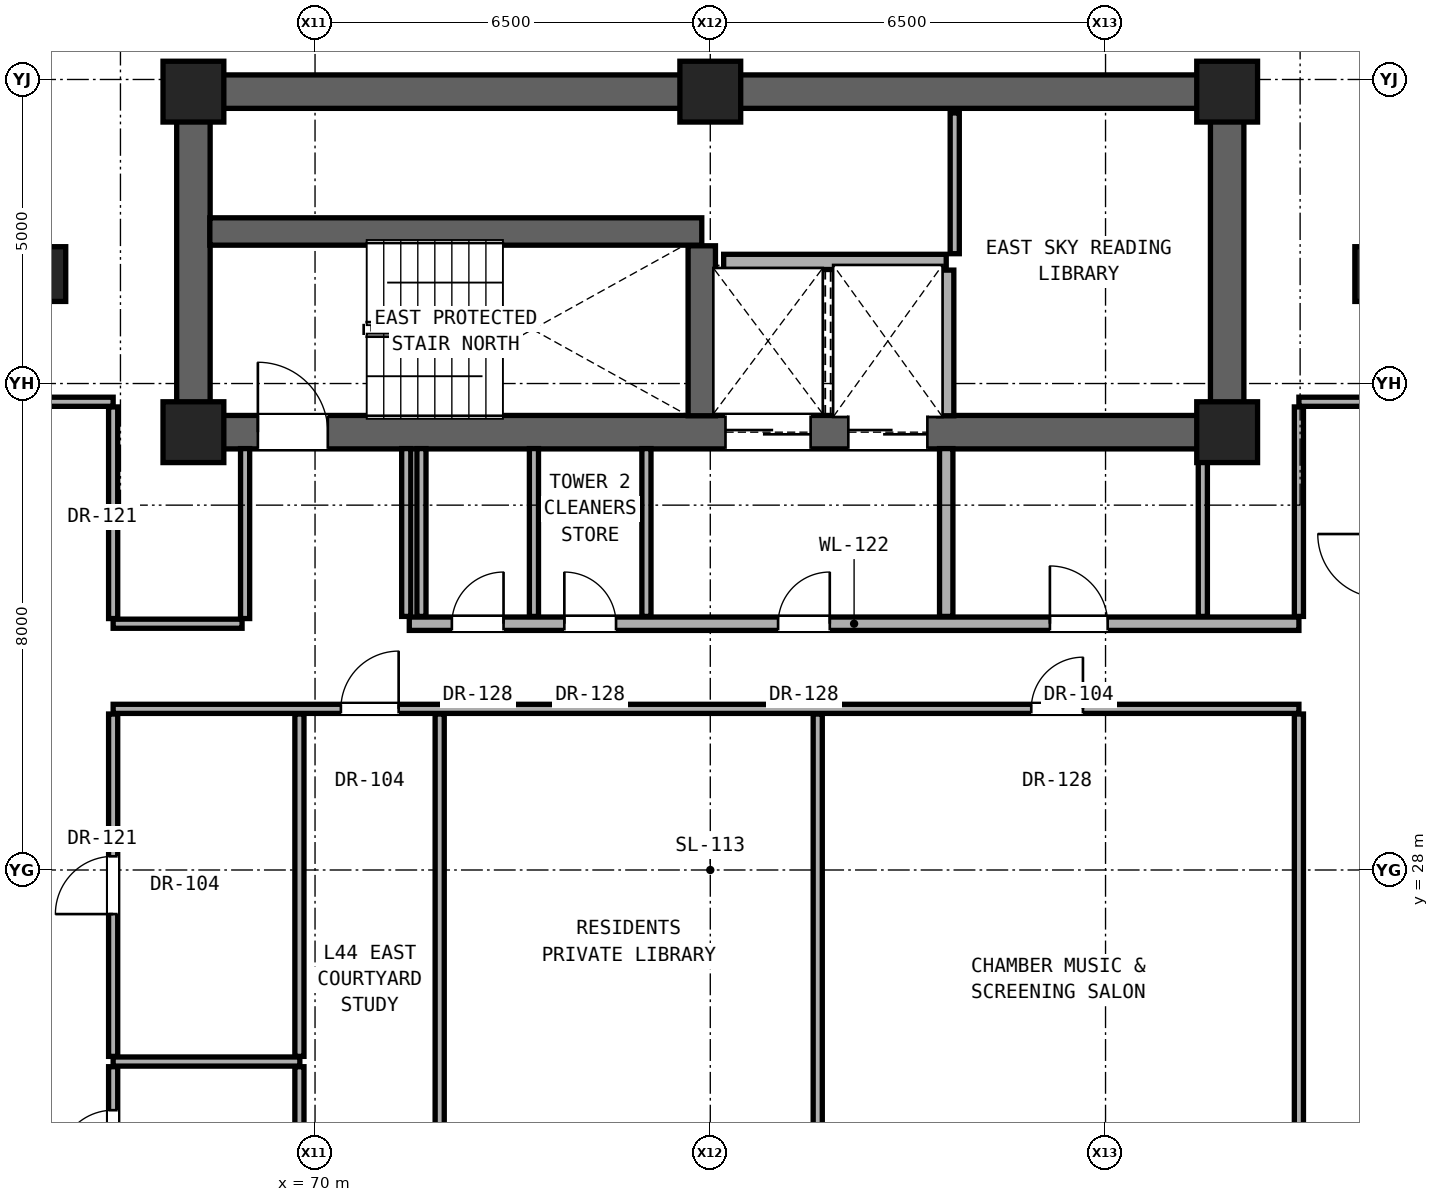
"""IFC4 building model, lengths in metres.
Left out: names, types, materials, properties, quantities, classifications, styles, units other than length and angle.
Written with IfcOpenShell. Run it as: python <this file> out.ifc"""

import sys

from ifc_helpers import new_model, si_unit, direction, frame, frame_2d, origin, origin_2d, place, context, subcontext, project, spatial, rectangle, extrude, element, fill, save


model = new_model("IFC4")
c1 = context("Model", 3, precision=1e-05, world=origin(), true_north=direction((0.0, 1.0)))
c2 = subcontext(c1, "Body", "Model", "MODEL_VIEW")
j1 = project(units=[si_unit("LENGTHUNIT", "METRE"), si_unit("PLANEANGLEUNIT", "RADIAN")], contexts=[c1])
p1 = place(None, origin())
s1 = spatial("IfcSite", under=j1, at=p1, CompositionType="ELEMENT")
p2 = place(p1, origin())
s2 = spatial("IfcBuilding", under=s1, at=p2, CompositionType="ELEMENT")
p3 = place(p2, frame((0.0, 0.0, 157.65)))
s3 = spatial("IfcBuildingStorey", under=s2, at=p3, CompositionType="ELEMENT", Elevation=157.65)
for number, where, z_axis, x_axis in (
    (1, (68.0, 35.2, 0.0), (0.0, 0.0, 1.0), (1.0, 0.0, 0.0)),
    (2, (85.0, 35.2, 0.0), (0.0, 0.0, 1.0), (1.0, 0.0, 0.0)),
    (3, (68.0, 40.8, 0.0), (0.0, 0.0, 1.0), (1.0, 0.0, 0.0)),
    (4, (76.5, 40.8, 0.0), (0.0, 0.0, 1.0), (1.0, 0.0, 0.0)),
    (5, (85.0, 40.8, 0.0), (0.0, 0.0, 1.0), (1.0, 0.0, 0.0)),
):
    element("IfcColumn", number, at=place(p3, frame(where, z_axis=z_axis, x_axis=x_axis)), inside=s3, PredefinedType="COLUMN", context=c2, shape_type="SweptSolid", body=[
        extrude(rectangle(XDim=1.0, YDim=1.0, at=origin_2d()), origin(), (0.0, 0.0, 1.0), 3.25),
    ])
for number, where, z_axis, x_axis in (
    (6, (65.6, 37.8, 0.0), (0.0, 0.0, 1.0), (1.0, 0.0, 0.0)),
    (7, (87.4, 37.8, 0.0), (0.0, 0.0, 1.0), (1.0, 0.0, 0.0)),
):
    element("IfcColumn", number, at=place(p3, frame(where, z_axis=z_axis, x_axis=x_axis)), inside=s3, PredefinedType="PILASTER", context=c2, shape_type="SweptSolid", body=[
        extrude(rectangle(XDim=0.6, YDim=0.9, at=origin_2d()), origin(), (0.0, 0.0, 1.0), 3.25),
    ])
p4 = place(p3, frame((68.0, 40.8, 0.0), z_axis=(0.0, 0.0, 1.0), x_axis=(1.0, 0.0, 0.0)))
e8 = element("IfcWall", 8, at=p4, inside=s3, PredefinedType="SHEAR", context=c2, shape_type="SweptSolid", body=[
    extrude(rectangle(XDim=17.0, YDim=0.55, at=frame_2d((8.5, 0.0))), origin(), (0.0, 0.0, 1.0), 3.05),
])
for number, where, z_axis, x_axis in (
    (9, (68.0, 35.2, 0.0), (0.0, 0.0, 1.0), (0.0, 1.0, 0.0)),
    (10, (85.0, 35.2, 0.0), (0.0, 0.0, 1.0), (0.0, 1.0, 0.0)),
):
    element("IfcWall", number, at=place(p3, frame(where, z_axis=z_axis, x_axis=x_axis)), inside=s3, PredefinedType="SHEAR", context=c2, shape_type="SweptSolid", body=[
        extrude(rectangle(XDim=5.6, YDim=0.55, at=frame_2d((2.8, 0.0))), origin(), (0.0, 0.0, 1.0), 3.05),
    ])
p5 = place(p3, frame((68.0, 35.2, 0.0), z_axis=(0.0, 0.0, 1.0), x_axis=(1.0, 0.0, 0.0)))
e11 = element("IfcWall", 11, at=p5, inside=s3, PredefinedType="SHEAR", context=c2, shape_type="SweptSolid", body=[
    extrude(rectangle(XDim=17.0, YDim=0.55, at=frame_2d((8.5, 0.0))), origin(), (0.0, 0.0, 1.0), 3.05),
])
p6 = place(p5, frame((1.06, 0.0, 0.0)))
e12 = element("IfcOpeningElement", 12, at=p6, cuts=e11, PredefinedType="OPENING", context=c2, shape_type="SweptSolid", body=[
    extrude(rectangle(XDim=1.15, YDim=2.2, at=frame_2d((0.575, 1.1))), frame((0.0, 0.285, 0.0), z_axis=(0.0, -1.0, 0.0), x_axis=(1.0, 0.0, 0.0)), (0.0, 0.0, 1.0), 0.57),
])
p7 = place(p5, frame((8.75, 0.0, 0.0)))
e13 = element("IfcOpeningElement", 13, at=p7, cuts=e11, PredefinedType="OPENING", context=c2, shape_type="SweptSolid", body=[
    extrude(rectangle(XDim=1.4, YDim=2.35, at=frame_2d((0.7, 1.175))), frame((0.0, 0.285, 0.0), z_axis=(0.0, -1.0, 0.0), x_axis=(1.0, 0.0, 0.0)), (0.0, 0.0, 1.0), 0.57),
])
p8 = place(p5, frame((10.77, 0.0, 0.0)))
e14 = element("IfcOpeningElement", 14, at=p8, cuts=e11, PredefinedType="OPENING", context=c2, shape_type="SweptSolid", body=[
    extrude(rectangle(XDim=1.3, YDim=2.3, at=frame_2d((0.65, 1.15))), frame((0.0, 0.285, 0.0), z_axis=(0.0, -1.0, 0.0), x_axis=(1.0, 0.0, 0.0)), (0.0, 0.0, 1.0), 0.57),
])
p9 = place(p3, frame((66.68, 24.85, 0.0), z_axis=(0.0, 0.0, 1.0), x_axis=(1.0, 0.0, 0.0)))
e15 = element("IfcWall", 15, at=p9, inside=s3, PredefinedType="PARTITIONING", context=c2, shape_type="SweptSolid", body=[
    extrude(rectangle(XDim=3.07, YDim=0.15, at=frame_2d((1.535, 0.0))), origin(), (0.0, 0.0, 1.0), 2.186),
])
p10 = place(p3, frame((66.68, 30.65, 0.0), z_axis=(0.0, 0.0, 1.0), x_axis=(1.0, 0.0, 0.0)))
e16 = element("IfcWall", 16, at=p10, inside=s3, PredefinedType="PARTITIONING", context=c2, shape_type="SweptSolid", body=[
    extrude(rectangle(XDim=19.5, YDim=0.15, at=frame_2d((9.75, 0.0))), origin(), (0.0, 0.0, 1.0), 2.186),
])
p11 = place(p10, frame((3.745, 0.0, 0.0)))
e17 = element("IfcOpeningElement", 17, at=p11, cuts=e16, PredefinedType="OPENING", context=c2, shape_type="SweptSolid", body=[
    extrude(rectangle(XDim=0.95, YDim=2.15, at=frame_2d((0.475, 1.075))), frame((0.0, 0.085, 0.0), z_axis=(0.0, -1.0, 0.0), x_axis=(1.0, 0.0, 0.0)), (0.0, 0.0, 1.0), 0.17),
])
p12 = place(p10, frame((15.098, 0.0, 0.0)))
e18 = element("IfcOpeningElement", 18, at=p12, cuts=e16, PredefinedType="OPENING", context=c2, shape_type="SweptSolid", body=[
    extrude(rectangle(XDim=0.85, YDim=2.01, at=frame_2d((0.425, 1.005))), frame((0.0, 0.085, 0.0), z_axis=(0.0, -1.0, 0.0), x_axis=(1.0, 0.0, 0.0)), (0.0, 0.0, 1.0), 0.17),
])
p13 = place(p3, frame((66.68, 32.05, 0.0), z_axis=(0.0, 0.0, 1.0), x_axis=(1.0, 0.0, 0.0)))
e19 = element("IfcWall", 19, at=p13, inside=s3, PredefinedType="PARTITIONING", context=c2, shape_type="SweptSolid", body=[
    extrude(rectangle(XDim=2.12, YDim=0.15, at=frame_2d((1.06, 0.0))), origin(), (0.0, 0.0, 1.0), 2.186),
])
p14 = place(p3, frame((71.55, 32.05, 0.0), z_axis=(0.0, 0.0, 1.0), x_axis=(1.0, 0.0, 0.0)))
e20 = element("IfcWall", 20, at=p14, inside=s3, PredefinedType="SOLIDWALL", context=c2, shape_type="SweptSolid", body=[
    extrude(rectangle(XDim=14.63, YDim=0.22, at=frame_2d((7.315, 0.0))), origin(), (0.0, 0.0, 1.0), 2.186),
])
p15 = place(p14, frame((6.065, 0.0, 0.0)))
e21 = element("IfcOpeningElement", 21, at=p15, cuts=e20, PredefinedType="OPENING", context=c2, shape_type="SweptSolid", body=[
    extrude(rectangle(XDim=0.85, YDim=2.01, at=frame_2d((0.425, 1.005))), frame((0.0, 0.12, 0.0), z_axis=(0.0, -1.0, 0.0), x_axis=(1.0, 0.0, 0.0)), (0.0, 0.0, 1.0), 0.24),
])
p16 = place(p14, frame((10.535, 0.0, 0.0)))
e22 = element("IfcOpeningElement", 22, at=p16, cuts=e20, PredefinedType="OPENING", context=c2, shape_type="SweptSolid", body=[
    extrude(rectangle(XDim=0.95, YDim=2.15, at=frame_2d((0.475, 1.075))), frame((0.0, 0.12, 0.0), z_axis=(0.0, -1.0, 0.0), x_axis=(1.0, 0.0, 0.0)), (0.0, 0.0, 1.0), 0.24),
])
p17 = place(p14, frame((0.7, 0.0, 0.0)))
e23 = element("IfcOpeningElement", 23, at=p17, cuts=e20, PredefinedType="OPENING", context=c2, shape_type="SweptSolid", body=[
    extrude(rectangle(XDim=0.85, YDim=2.01, at=frame_2d((0.425, 1.005))), frame((0.0, 0.12, 0.0), z_axis=(0.0, -1.0, 0.0), x_axis=(1.0, 0.0, 0.0)), (0.0, 0.0, 1.0), 0.24),
])
p18 = place(p14, frame((2.55, 0.0, 0.0)))
e24 = element("IfcOpeningElement", 24, at=p18, cuts=e20, PredefinedType="OPENING", context=c2, shape_type="SweptSolid", body=[
    extrude(rectangle(XDim=0.85, YDim=2.01, at=frame_2d((0.425, 1.005))), frame((0.0, 0.12, 0.0), z_axis=(0.0, -1.0, 0.0), x_axis=(1.0, 0.0, 0.0)), (0.0, 0.0, 1.0), 0.24),
])
p19 = place(p3, frame((65.32, 35.7, 0.0), z_axis=(0.0, 0.0, 1.0), x_axis=(1.0, 0.0, 0.0)))
e25 = element("IfcWall", 25, at=p19, inside=s3, PredefinedType="PARTITIONING", context=c2, shape_type="SweptSolid", body=[
    extrude(rectangle(XDim=1.36, YDim=0.15, at=frame_2d((0.68, 0.0))), origin(), (0.0, 0.0, 1.0), 3.05),
])
p20 = place(p3, frame((86.18, 35.7, 0.0), z_axis=(0.0, 0.0, 1.0), x_axis=(1.0, 0.0, 0.0)))
e26 = element("IfcWall", 26, at=p20, inside=s3, PredefinedType="PARTITIONING", context=c2, shape_type="SweptSolid", body=[
    extrude(rectangle(XDim=1.36, YDim=0.15, at=frame_2d((0.68, 0.0))), origin(), (0.0, 0.0, 1.0), 3.05),
])
p21 = place(p3, frame((76.72, 38.0, 0.0), z_axis=(0.0, 0.0, 1.0), x_axis=(1.0, 0.0, 0.0)))
e27 = element("IfcWall", 27, at=p21, inside=s3, PredefinedType="SOLIDWALL", context=c2, shape_type="SweptSolid", body=[
    extrude(rectangle(XDim=3.66, YDim=0.25, at=frame_2d((1.83, 0.0))), origin(), (0.0, 0.0, 1.0), 3.05),
])
p22 = place(p3, frame((68.27, 38.5, 0.0), z_axis=(0.0, 0.0, 1.0), x_axis=(1.0, 0.0, 0.0)))
e28 = element("IfcWall", 28, at=p22, inside=s3, PredefinedType="SHEAR", context=c2, shape_type="SweptSolid", body=[
    extrude(rectangle(XDim=8.09, YDim=0.45, at=frame_2d((4.045, 0.0))), origin(), (0.0, 0.0, 1.0), 3.05),
])
p23 = place(p3, frame((66.68, 22.435, 0.0), z_axis=(0.0, 0.0, 1.0), x_axis=(0.0, 1.0, 0.0)))
e29 = element("IfcWall", 29, at=p23, inside=s3, PredefinedType="PARTITIONING", context=c2, shape_type="SweptSolid", body=[
    extrude(rectangle(XDim=2.33, YDim=0.15, at=frame_2d((1.165, 0.0))), origin(), (0.0, 0.0, 1.0), 3.05),
])
p24 = place(p23, frame((0.715, 0.0, 0.0)))
e30 = element("IfcOpeningElement", 30, at=p24, cuts=e29, PredefinedType="OPENING", context=c2, shape_type="SweptSolid", body=[
    extrude(rectangle(XDim=0.9, YDim=2.1, at=frame_2d((0.45, 1.05))), frame((0.0, 0.085, 0.0), z_axis=(0.0, -1.0, 0.0), x_axis=(1.0, 0.0, 0.0)), (0.0, 0.0, 1.0), 0.17),
])
p25 = place(p3, frame((66.68, 24.935, 0.0), z_axis=(0.0, 0.0, 1.0), x_axis=(0.0, 1.0, 0.0)))
e31 = element("IfcWall", 31, at=p25, inside=s3, PredefinedType="PARTITIONING", context=c2, shape_type="SweptSolid", body=[
    extrude(rectangle(XDim=5.63, YDim=0.15, at=frame_2d((2.815, 0.0))), origin(), (0.0, 0.0, 1.0), 2.346),
])
p26 = place(p25, frame((2.34, 0.0, 0.0)))
e32 = element("IfcOpeningElement", 32, at=p26, cuts=e31, PredefinedType="OPENING", context=c2, shape_type="SweptSolid", body=[
    extrude(rectangle(XDim=0.95, YDim=2.15, at=frame_2d((0.475, 1.075))), frame((0.0, 0.085, 0.0), z_axis=(0.0, -1.0, 0.0), x_axis=(1.0, 0.0, 0.0)), (0.0, 0.0, 1.0), 0.17),
])
p27 = place(p3, frame((66.68, 32.135, 0.0), z_axis=(0.0, 0.0, 1.0), x_axis=(0.0, 1.0, 0.0)))
e33 = element("IfcWall", 33, at=p27, inside=s3, PredefinedType="PARTITIONING", context=c2, shape_type="SweptSolid", body=[
    extrude(rectangle(XDim=3.48, YDim=0.15, at=frame_2d((1.74, 0.0))), origin(), (0.0, 0.0, 1.0), 2.442),
])
p28 = place(p3, frame((68.85, 32.135, 0.0), z_axis=(0.0, 0.0, 1.0), x_axis=(0.0, 1.0, 0.0)))
e34 = element("IfcWall", 34, at=p28, inside=s3, PredefinedType="PARTITIONING", context=c2, shape_type="SweptSolid", body=[
    extrude(rectangle(XDim=2.795, YDim=0.15, at=frame_2d((1.397, 0.0))), origin(), (0.0, 0.0, 1.0), 3.05),
])
p29 = place(p3, frame((69.743, 22.435, 0.0), z_axis=(0.0, 0.0, 1.0), x_axis=(0.0, 1.0, 0.0)))
e35 = element("IfcWall", 35, at=p29, inside=s3, PredefinedType="PARTITIONING", context=c2, shape_type="SweptSolid", body=[
    extrude(rectangle(XDim=2.33, YDim=0.15, at=frame_2d((1.165, 0.0))), origin(), (0.0, 0.0, 1.0), 3.05),
])
p30 = place(p3, frame((69.743, 24.935, 0.0), z_axis=(0.0, 0.0, 1.0), x_axis=(0.0, 1.0, 0.0)))
e36 = element("IfcWall", 36, at=p30, inside=s3, PredefinedType="PARTITIONING", context=c2, shape_type="SweptSolid", body=[
    extrude(rectangle(XDim=5.63, YDim=0.15, at=frame_2d((2.815, 0.0))), origin(), (0.0, 0.0, 1.0), 2.186),
])
for number, where, z_axis, x_axis in (
    (37, (71.5, 32.17, 0.0), (0.0, 0.0, 1.0), (0.0, 1.0, 0.0)),
    (38, (71.75, 32.17, 0.0), (0.0, 0.0, 1.0), (0.0, 1.0, 0.0)),
):
    element("IfcWall", number, at=place(p3, frame(where, z_axis=z_axis, x_axis=x_axis)), inside=s3, PredefinedType="PARTITIONING", context=c2, shape_type="SweptSolid", body=[
        extrude(rectangle(XDim=2.76, YDim=0.15, at=frame_2d((1.38, 0.0))), origin(), (0.0, 0.0, 1.0), 3.05),
    ])
p31 = place(p3, frame((72.05, 22.435, 0.0), z_axis=(0.0, 0.0, 1.0), x_axis=(0.0, 1.0, 0.0)))
e39 = element("IfcWall", 39, at=p31, inside=s3, PredefinedType="PARTITIONING", context=c2, shape_type="SweptSolid", body=[
    extrude(rectangle(XDim=8.13, YDim=0.15, at=frame_2d((4.065, 0.0))), origin(), (0.0, 0.0, 1.0), 2.186),
])
for number, where, z_axis, x_axis in (
    (40, (73.6, 32.17, 0.0), (0.0, 0.0, 1.0), (0.0, 1.0, 0.0)),
    (41, (75.45, 32.17, 0.0), (0.0, 0.0, 1.0), (0.0, 1.0, 0.0)),
):
    element("IfcWall", number, at=place(p3, frame(where, z_axis=z_axis, x_axis=x_axis)), inside=s3, PredefinedType="PARTITIONING", context=c2, shape_type="SweptSolid", body=[
        extrude(rectangle(XDim=2.76, YDim=0.15, at=frame_2d((1.38, 0.0))), origin(), (0.0, 0.0, 1.0), 3.05),
    ])
p32 = place(p3, frame((76.36, 35.47, 0.0), z_axis=(0.0, 0.0, 1.0), x_axis=(0.0, 1.0, 0.0)))
e42 = element("IfcWall", 42, at=p32, inside=s3, PredefinedType="SHEAR", context=c2, shape_type="SweptSolid", body=[
    extrude(rectangle(XDim=2.795, YDim=0.45, at=frame_2d((1.397, 0.0))), origin(), (0.0, 0.0, 1.0), 3.05),
])
p33 = place(p3, frame((78.267, 22.435, 0.0), z_axis=(0.0, 0.0, 1.0), x_axis=(0.0, 1.0, 0.0)))
e43 = element("IfcWall", 43, at=p33, inside=s3, PredefinedType="PARTITIONING", context=c2, shape_type="SweptSolid", body=[
    extrude(rectangle(XDim=8.13, YDim=0.15, at=frame_2d((4.065, 0.0))), origin(), (0.0, 0.0, 1.0), 2.186),
])
p34 = place(p3, frame((80.38, 32.17, 0.0), z_axis=(0.0, 0.0, 1.0), x_axis=(0.0, 1.0, 0.0)))
e44 = element("IfcWall", 44, at=p34, inside=s3, PredefinedType="SOLIDWALL", context=c2, shape_type="SweptSolid", body=[
    extrude(rectangle(XDim=2.76, YDim=0.22, at=frame_2d((1.38, 0.0))), origin(), (0.0, 0.0, 1.0), 3.05),
])
p35 = place(p3, frame((80.38, 35.47, 0.0), z_axis=(0.0, 0.0, 1.0), x_axis=(0.0, 1.0, 0.0)))
e45 = element("IfcWall", 45, at=p35, inside=s3, PredefinedType="SOLIDWALL", context=c2, shape_type="SweptSolid", body=[
    extrude(rectangle(XDim=2.395, YDim=0.25, at=frame_2d((1.198, 0.0))), origin(), (0.0, 0.0, 1.0), 3.05),
])
p36 = place(p3, frame((80.52, 38.135, 0.0), z_axis=(0.0, 0.0, 1.0), x_axis=(0.0, 1.0, 0.0)))
e46 = element("IfcWall", 46, at=p36, inside=s3, PredefinedType="PARTITIONING", context=c2, shape_type="SweptSolid", body=[
    extrude(rectangle(XDim=2.315, YDim=0.15, at=frame_2d((1.157, 0.0))), origin(), (0.0, 0.0, 1.0), 3.05),
])
p37 = place(p3, frame((84.6, 32.17, 0.0), z_axis=(0.0, 0.0, 1.0), x_axis=(0.0, 1.0, 0.0)))
e47 = element("IfcWall", 47, at=p37, inside=s3, PredefinedType="PARTITIONING", context=c2, shape_type="SweptSolid", body=[
    extrude(rectangle(XDim=2.76, YDim=0.15, at=frame_2d((1.38, 0.0))), origin(), (0.0, 0.0, 1.0), 3.05),
])
p38 = place(p3, frame((86.18, 22.435, 0.0), z_axis=(0.0, 0.0, 1.0), x_axis=(0.0, 1.0, 0.0)))
e48 = element("IfcWall", 48, at=p38, inside=s3, PredefinedType="PARTITIONING", context=c2, shape_type="SweptSolid", body=[
    extrude(rectangle(XDim=8.13, YDim=0.15, at=frame_2d((4.065, 0.0))), origin(), (0.0, 0.0, 1.0), 2.346),
])
p39 = place(p3, frame((86.18, 32.17, 0.0), z_axis=(0.0, 0.0, 1.0), x_axis=(0.0, 1.0, 0.0)))
e49 = element("IfcWall", 49, at=p39, inside=s3, PredefinedType="PARTITIONING", context=c2, shape_type="SweptSolid", body=[
    extrude(rectangle(XDim=3.445, YDim=0.15, at=frame_2d((1.723, 0.0))), origin(), (0.0, 0.0, 1.0), 2.442),
])
p40 = place(p6, origin())
e50 = element("IfcDoor", 50, at=p40, inside=s3, OperationType="SINGLE_SWING_LEFT", PredefinedType="DOOR", context=c2, shape_type="SweptSolid", body=[
    extrude(rectangle(XDim=1.15, YDim=2.2, at=frame_2d((0.575, 1.1))), frame((0.0, 0.025, 0.0), z_axis=(0.0, -1.0, 0.0), x_axis=(1.0, 0.0, 0.0)), (0.0, 0.0, 1.0), 0.05),
])
fill(e12, e50)
p41 = place(p15, origin())
e51 = element("IfcDoor", 51, at=p41, inside=s3, OperationType="SINGLE_SWING_RIGHT", PredefinedType="DOOR", context=c2, shape_type="SweptSolid", body=[
    extrude(rectangle(XDim=0.85, YDim=2.01, at=frame_2d((0.425, 1.005))), frame((0.0, 0.025, 0.0), z_axis=(0.0, -1.0, 0.0), x_axis=(1.0, 0.0, 0.0)), (0.0, 0.0, 1.0), 0.05),
])
fill(e21, e51)
p42 = place(p16, origin())
e52 = element("IfcDoor", 52, at=p42, inside=s3, OperationType="SINGLE_SWING_LEFT", PredefinedType="DOOR", context=c2, shape_type="SweptSolid", body=[
    extrude(rectangle(XDim=0.95, YDim=2.15, at=frame_2d((0.475, 1.075))), frame((0.0, 0.025, 0.0), z_axis=(0.0, -1.0, 0.0), x_axis=(1.0, 0.0, 0.0)), (0.0, 0.0, 1.0), 0.05),
])
fill(e22, e52)
p43 = place(p17, origin())
e53 = element("IfcDoor", 53, at=p43, inside=s3, OperationType="SINGLE_SWING_RIGHT", PredefinedType="DOOR", context=c2, shape_type="SweptSolid", body=[
    extrude(rectangle(XDim=0.85, YDim=2.01, at=frame_2d((0.425, 1.005))), frame((0.0, 0.025, 0.0), z_axis=(0.0, -1.0, 0.0), x_axis=(1.0, 0.0, 0.0)), (0.0, 0.0, 1.0), 0.05),
])
fill(e23, e53)
p44 = place(p18, origin())
e54 = element("IfcDoor", 54, at=p44, inside=s3, OperationType="SINGLE_SWING_LEFT", PredefinedType="DOOR", context=c2, shape_type="SweptSolid", body=[
    extrude(rectangle(XDim=0.85, YDim=2.01, at=frame_2d((0.425, 1.005))), frame((0.0, 0.025, 0.0), z_axis=(0.0, -1.0, 0.0), x_axis=(1.0, 0.0, 0.0)), (0.0, 0.0, 1.0), 0.05),
])
fill(e24, e54)
p45 = place(p24, origin())
e55 = element("IfcDoor", 55, at=p45, inside=s3, OperationType="SINGLE_SWING_LEFT", PredefinedType="DOOR", context=c2, shape_type="SweptSolid", body=[
    extrude(rectangle(XDim=0.9, YDim=2.1, at=frame_2d((0.45, 1.05))), frame((0.0, 0.025, 0.0), z_axis=(0.0, -1.0, 0.0), x_axis=(1.0, 0.0, 0.0)), (0.0, 0.0, 1.0), 0.05),
])
fill(e30, e55)
p46 = place(p26, origin())
e56 = element("IfcDoor", 56, at=p46, inside=s3, OperationType="SINGLE_SWING_LEFT", PredefinedType="DOOR", context=c2, shape_type="SweptSolid", body=[
    extrude(rectangle(XDim=0.95, YDim=2.15, at=frame_2d((0.475, 1.075))), frame((0.0, 0.025, 0.0), z_axis=(0.0, -1.0, 0.0), x_axis=(1.0, 0.0, 0.0)), (0.0, 0.0, 1.0), 0.05),
])
fill(e32, e56)
p47 = place(p11, origin())
e57 = element("IfcDoor", 57, at=p47, inside=s3, OperationType="SINGLE_SWING_RIGHT", PredefinedType="DOOR", context=c2, shape_type="SweptSolid", body=[
    extrude(rectangle(XDim=0.95, YDim=2.15, at=frame_2d((0.475, 1.075))), frame((0.0, 0.025, 0.0), z_axis=(0.0, -1.0, 0.0), x_axis=(1.0, 0.0, 0.0)), (0.0, 0.0, 1.0), 0.05),
])
fill(e17, e57)
p48 = place(p12, origin())
e58 = element("IfcDoor", 58, at=p48, inside=s3, OperationType="SINGLE_SWING_RIGHT", PredefinedType="DOOR", context=c2, shape_type="SweptSolid", body=[
    extrude(rectangle(XDim=0.85, YDim=2.01, at=frame_2d((0.425, 1.005))), frame((0.0, 0.025, 0.0), z_axis=(0.0, -1.0, 0.0), x_axis=(1.0, 0.0, 0.0)), (0.0, 0.0, 1.0), 0.05),
])
fill(e18, e58)
p49 = place(p7, origin())
e59 = element("IfcDoor", 59, at=p49, inside=s3, OperationType="DOUBLE_DOOR_SLIDING", PredefinedType="DOOR", context=c2, shape_type="SweptSolid", body=[
    extrude(rectangle(XDim=1.4, YDim=2.35, at=frame_2d((0.7, 1.175))), frame((0.0, 0.025, 0.0), z_axis=(0.0, -1.0, 0.0), x_axis=(1.0, 0.0, 0.0)), (0.0, 0.0, 1.0), 0.05),
])
fill(e13, e59)
p50 = place(p8, origin())
e60 = element("IfcDoor", 60, at=p50, inside=s3, OperationType="DOUBLE_DOOR_SLIDING", PredefinedType="DOOR", context=c2, shape_type="SweptSolid", body=[
    extrude(rectangle(XDim=1.3, YDim=2.3, at=frame_2d((0.65, 1.15))), frame((0.0, 0.025, 0.0), z_axis=(0.0, -1.0, 0.0), x_axis=(1.0, 0.0, 0.0)), (0.0, 0.0, 1.0), 0.05),
])
fill(e14, e60)
save(model, sys.argv[1])
